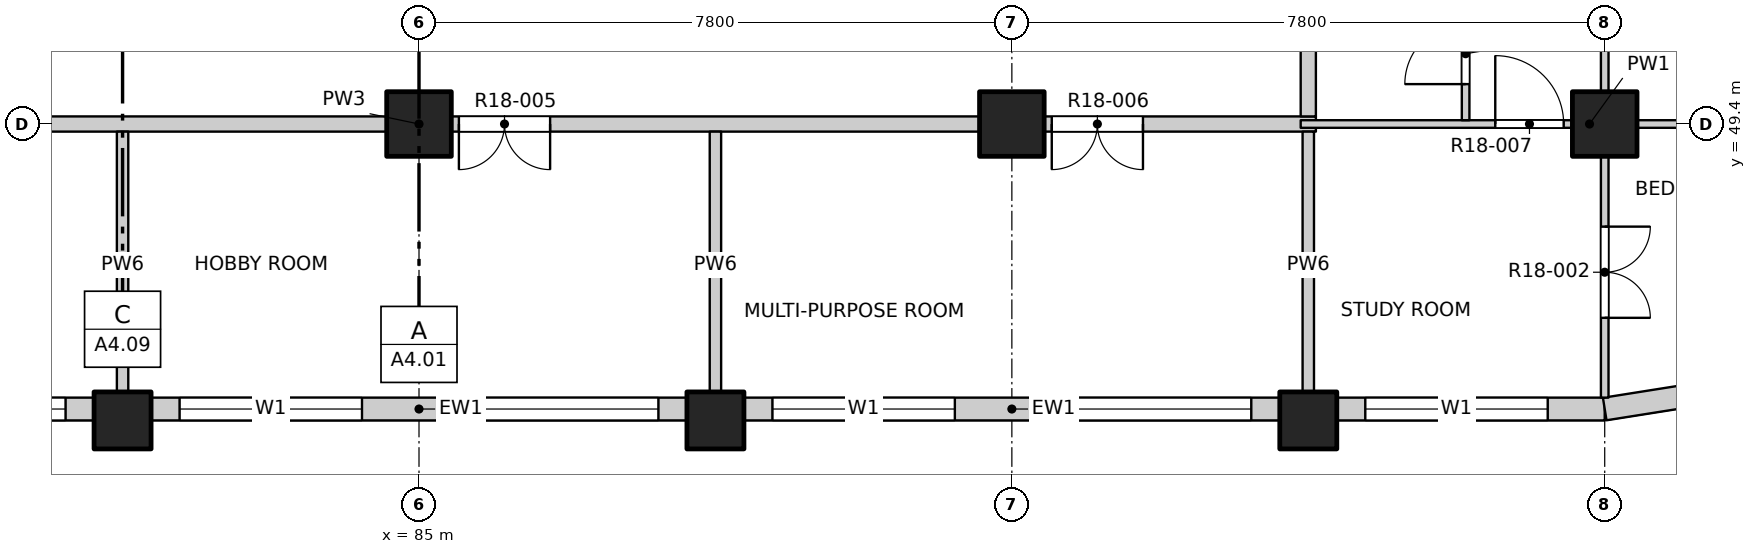
"""IFC4 building model, lengths in metres.
Left out: names, types, materials, properties, quantities, classifications, styles, units other than length and angle.
Written with IfcOpenShell. Run it as: python <this file> out.ifc"""

import sys

from ifc_helpers import new_model, si_unit, direction, frame, frame_2d, origin, origin_2d, place, context, subcontext, project, spatial, rectangle, extrude, element, fill, save


model = new_model("IFC4")
c1 = context("Model", 3, precision=1e-05, world=origin(), true_north=direction((0.0, 1.0)))
c2 = subcontext(c1, "Body", "Model", "MODEL_VIEW")
j1 = project(units=[si_unit("LENGTHUNIT", "METRE"), si_unit("PLANEANGLEUNIT", "RADIAN")], contexts=[c1])
p1 = place(None, origin())
s1 = spatial("IfcSite", under=j1, at=p1, CompositionType="ELEMENT")
p2 = place(p1, origin())
s2 = spatial("IfcBuilding", under=s1, at=p2, CompositionType="ELEMENT")
p3 = place(p2, frame((0.0, 0.0, 186.0)))
s3 = spatial("IfcBuildingStorey", under=s2, at=p3, CompositionType="ELEMENT", Elevation=186.0)
for number, where, z_axis, x_axis in (
    (1, (81.1, 45.5, -0.25), (0.0, 0.0, 1.0), (1.0, 0.0, 0.0)),
    (2, (88.9, 45.5, -0.25), (0.0, 0.0, 1.0), (1.0, 0.0, 0.0)),
    (3, (96.7, 45.5, -0.25), (0.0, 0.0, 1.0), (1.0, 0.0, 0.0)),
):
    element("IfcColumn", number, at=place(p3, frame(where, z_axis=z_axis, x_axis=x_axis)), inside=s3, PredefinedType="COLUMN", context=c2, shape_type="SweptSolid", body=[
        extrude(rectangle(XDim=0.75, YDim=0.75, at=origin_2d()), origin(), (0.0, 0.0, 1.0), 3.4),
    ])
for number, where, z_axis, x_axis in (
    (4, (85.0, 49.4, -0.25), (0.0, 0.0, 1.0), (1.0, 0.0, 0.0)),
    (5, (92.8, 49.4, -0.25), (0.0, 0.0, 1.0), (1.0, 0.0, 0.0)),
    (6, (100.6, 49.4, -0.25), (0.0, 0.0, 1.0), (1.0, 0.0, 0.0)),
):
    element("IfcColumn", number, at=place(p3, frame(where, z_axis=z_axis, x_axis=x_axis)), inside=s3, PredefinedType="COLUMN", context=c2, shape_type="SweptSolid", body=[
        extrude(rectangle(XDim=0.85, YDim=0.85, at=origin_2d()), origin(), (0.0, 0.0, 1.0), 3.4),
    ])
p4 = place(p3, frame((73.675, 45.65, 0.0), z_axis=(0.0, 0.0, 1.0), x_axis=(1.0, 0.0, 0.0)))
e7 = element("IfcWall", 7, at=p4, inside=s3, PredefinedType="SOLIDWALL", context=c2, shape_type="SweptSolid", body=[
    extrude(rectangle(XDim=7.05, YDim=0.3, at=frame_2d((3.525, 0.0))), origin(), (0.0, 0.0, 1.0), 2.7),
])
p5 = place(p4, frame((0.375, 0.0, 0.9)))
e8 = element("IfcOpeningElement", 8, at=p5, cuts=e7, PredefinedType="OPENING", context=c2, shape_type="SweptSolid", body=[
    extrude(rectangle(XDim=2.4, YDim=1.8, at=frame_2d((1.2, 0.9))), frame((0.0, 0.16, 0.0), z_axis=(0.0, -1.0, 0.0), x_axis=(1.0, 0.0, 0.0)), (0.0, 0.0, 1.0), 0.32),
])
p6 = place(p4, frame((4.275, 0.0, 0.9)))
e9 = element("IfcOpeningElement", 9, at=p6, cuts=e7, PredefinedType="OPENING", context=c2, shape_type="SweptSolid", body=[
    extrude(rectangle(XDim=2.4, YDim=1.8, at=frame_2d((1.2, 0.9))), frame((0.0, 0.16, 0.0), z_axis=(0.0, -1.0, 0.0), x_axis=(1.0, 0.0, 0.0)), (0.0, 0.0, 1.0), 0.32),
])
p7 = place(p3, frame((81.475, 45.65, 0.0), z_axis=(0.0, 0.0, 1.0), x_axis=(1.0, 0.0, 0.0)))
e10 = element("IfcWall", 10, at=p7, inside=s3, PredefinedType="SOLIDWALL", context=c2, shape_type="SweptSolid", body=[
    extrude(rectangle(XDim=7.05, YDim=0.3, at=frame_2d((3.525, 0.0))), origin(), (0.0, 0.0, 1.0), 2.7),
])
p8 = place(p7, frame((0.375, 0.0, 0.9)))
e11 = element("IfcOpeningElement", 11, at=p8, cuts=e10, PredefinedType="OPENING", context=c2, shape_type="SweptSolid", body=[
    extrude(rectangle(XDim=2.4, YDim=1.8, at=frame_2d((1.2, 0.9))), frame((0.0, 0.16, 0.0), z_axis=(0.0, -1.0, 0.0), x_axis=(1.0, 0.0, 0.0)), (0.0, 0.0, 1.0), 0.32),
])
p9 = place(p7, frame((4.275, 0.0, 0.9)))
e12 = element("IfcOpeningElement", 12, at=p9, cuts=e10, PredefinedType="OPENING", context=c2, shape_type="SweptSolid", body=[
    extrude(rectangle(XDim=2.4, YDim=1.8, at=frame_2d((1.2, 0.9))), frame((0.0, 0.16, 0.0), z_axis=(0.0, -1.0, 0.0), x_axis=(1.0, 0.0, 0.0)), (0.0, 0.0, 1.0), 0.32),
])
p10 = place(p3, frame((89.275, 45.65, 0.0), z_axis=(0.0, 0.0, 1.0), x_axis=(1.0, 0.0, 0.0)))
e13 = element("IfcWall", 13, at=p10, inside=s3, PredefinedType="SOLIDWALL", context=c2, shape_type="SweptSolid", body=[
    extrude(rectangle(XDim=7.05, YDim=0.3, at=frame_2d((3.525, 0.0))), origin(), (0.0, 0.0, 1.0), 2.7),
])
p11 = place(p10, frame((0.375, 0.0, 0.9)))
e14 = element("IfcOpeningElement", 14, at=p11, cuts=e13, PredefinedType="OPENING", context=c2, shape_type="SweptSolid", body=[
    extrude(rectangle(XDim=2.4, YDim=1.8, at=frame_2d((1.2, 0.9))), frame((0.0, 0.16, 0.0), z_axis=(0.0, -1.0, 0.0), x_axis=(1.0, 0.0, 0.0)), (0.0, 0.0, 1.0), 0.32),
])
p12 = place(p10, frame((4.275, 0.0, 0.9)))
e15 = element("IfcOpeningElement", 15, at=p12, cuts=e13, PredefinedType="OPENING", context=c2, shape_type="SweptSolid", body=[
    extrude(rectangle(XDim=2.4, YDim=1.8, at=frame_2d((1.2, 0.9))), frame((0.0, 0.16, 0.0), z_axis=(0.0, -1.0, 0.0), x_axis=(1.0, 0.0, 0.0)), (0.0, 0.0, 1.0), 0.32),
])
p13 = place(p3, frame((97.075, 45.65, 0.0), z_axis=(0.0, 0.0, 1.0), x_axis=(1.0, 0.0, 0.0)))
e16 = element("IfcWall", 16, at=p13, inside=s3, PredefinedType="SOLIDWALL", context=c2, shape_type="SweptSolid", body=[
    extrude(rectangle(XDim=3.525, YDim=0.3, at=frame_2d((1.763, 0.0))), origin(), (0.0, 0.0, 1.0), 2.7),
])
p14 = place(p13, frame((0.375, 0.0, 0.9)))
e17 = element("IfcOpeningElement", 17, at=p14, cuts=e16, PredefinedType="OPENING", context=c2, shape_type="SweptSolid", body=[
    extrude(rectangle(XDim=2.4, YDim=1.8, at=frame_2d((1.2, 0.9))), frame((0.0, 0.16, 0.0), z_axis=(0.0, -1.0, 0.0), x_axis=(1.0, 0.0, 0.0)), (0.0, 0.0, 1.0), 0.32),
])
p15 = place(p3, frame((100.6, 45.65, 0.0), z_axis=(0.0, 0.0, 1.0), x_axis=(0.987678452879, 0.156496880861, 0.0)))
e18 = element("IfcWall", 18, at=p15, inside=s3, PredefinedType="SOLIDWALL", context=c2, shape_type="SweptSolid", body=[
    extrude(rectangle(XDim=1.173, YDim=0.3, at=frame_2d((0.586, 0.0))), origin(), (0.0, 0.0, 1.0), 2.7),
])
p16 = place(p3, frame((73.2, 49.4, 0.0), z_axis=(0.0, 0.0, 1.0), x_axis=(1.0, 0.0, 0.0)))
e19 = element("IfcWall", 19, at=p16, inside=s3, PredefinedType="PARTITIONING", context=c2, shape_type="SweptSolid", body=[
    extrude(rectangle(XDim=23.6, YDim=0.2, at=frame_2d((11.8, 0.0))), origin(), (0.0, 0.0, 1.0), 3.15),
])
p17 = place(p16, frame((4.525, 0.0, 0.0)))
e20 = element("IfcOpeningElement", 20, at=p17, cuts=e19, PredefinedType="OPENING", context=c2, shape_type="SweptSolid", body=[
    extrude(rectangle(XDim=1.2, YDim=2.1, at=frame_2d((0.6, 1.05))), frame((0.0, 0.11, 0.0), z_axis=(0.0, -1.0, 0.0), x_axis=(1.0, 0.0, 0.0)), (0.0, 0.0, 1.0), 0.22),
])
p18 = place(p16, frame((12.325, 0.0, 0.0)))
e21 = element("IfcOpeningElement", 21, at=p18, cuts=e19, PredefinedType="OPENING", context=c2, shape_type="SweptSolid", body=[
    extrude(rectangle(XDim=1.2, YDim=2.1, at=frame_2d((0.6, 1.05))), frame((0.0, 0.11, 0.0), z_axis=(0.0, -1.0, 0.0), x_axis=(1.0, 0.0, 0.0)), (0.0, 0.0, 1.0), 0.22),
])
p19 = place(p16, frame((20.125, 0.0, 0.0)))
e22 = element("IfcOpeningElement", 22, at=p19, cuts=e19, PredefinedType="OPENING", context=c2, shape_type="SweptSolid", body=[
    extrude(rectangle(XDim=1.2, YDim=2.1, at=frame_2d((0.6, 1.05))), frame((0.0, 0.11, 0.0), z_axis=(0.0, -1.0, 0.0), x_axis=(1.0, 0.0, 0.0)), (0.0, 0.0, 1.0), 0.22),
])
p20 = place(p3, frame((96.6, 49.4, 0.0), z_axis=(0.0, 0.0, 1.0), x_axis=(1.0, 0.0, 0.0)))
e23 = element("IfcWall", 23, at=p20, inside=s3, PredefinedType="PARTITIONING", context=c2, shape_type="SweptSolid", body=[
    extrude(rectangle(XDim=7.6, YDim=0.1, at=frame_2d((3.8, 0.0))), origin(), (0.0, 0.0, 1.0), 3.15),
])
p21 = place(p20, frame((2.56, 0.0, 0.0)))
e24 = element("IfcOpeningElement", 24, at=p21, cuts=e23, PredefinedType="OPENING", context=c2, shape_type="SweptSolid", body=[
    extrude(rectangle(XDim=0.9, YDim=2.1, at=frame_2d((0.45, 1.05))), frame((0.0, 0.06, 0.0), z_axis=(0.0, -1.0, 0.0), x_axis=(1.0, 0.0, 0.0)), (0.0, 0.0, 1.0), 0.12),
])
for number, where, z_axis, x_axis in (
    (25, (81.1, 45.8, 0.0), (0.0, 0.0, 1.0), (0.0, 1.0, 0.0)),
    (26, (88.9, 45.8, 0.0), (0.0, 0.0, 1.0), (0.0, 1.0, 0.0)),
    (27, (96.7, 45.8, 0.0), (0.0, 0.0, 1.0), (0.0, 1.0, 0.0)),
):
    element("IfcWall", number, at=place(p3, frame(where, z_axis=z_axis, x_axis=x_axis)), inside=s3, PredefinedType="PARTITIONING", context=c2, shape_type="SweptSolid", body=[
        extrude(rectangle(XDim=3.5, YDim=0.15, at=frame_2d((1.75, 0.0))), origin(), (0.0, 0.0, 1.0), 3.15),
    ])
p22 = place(p3, frame((96.7, 49.5, 0.0), z_axis=(0.0, 0.0, 1.0), x_axis=(0.0, 1.0, 0.0)))
e28 = element("IfcWall", 28, at=p22, inside=s3, PredefinedType="PARTITIONING", context=c2, shape_type="SweptSolid", body=[
    extrude(rectangle(XDim=34.7, YDim=0.2, at=frame_2d((17.35, 0.0))), origin(), (0.0, 0.0, 1.0), 3.15),
])
p23 = place(p22, frame((7.425, 0.0, 0.0)))
e29 = element("IfcOpeningElement", 29, at=p23, cuts=e28, PredefinedType="OPENING", context=c2, shape_type="SweptSolid", body=[
    extrude(rectangle(XDim=1.0, YDim=2.1, at=frame_2d((0.5, 1.05))), frame((0.0, 0.11, 0.0), z_axis=(0.0, -1.0, 0.0), x_axis=(1.0, 0.0, 0.0)), (0.0, 0.0, 1.0), 0.22),
])
p24 = place(p22, frame((18.475, 0.0, 0.0)))
e30 = element("IfcOpeningElement", 30, at=p24, cuts=e28, PredefinedType="OPENING", context=c2, shape_type="SweptSolid", body=[
    extrude(rectangle(XDim=1.0, YDim=2.1, at=frame_2d((0.5, 1.05))), frame((0.0, 0.11, 0.0), z_axis=(0.0, -1.0, 0.0), x_axis=(1.0, 0.0, 0.0)), (0.0, 0.0, 1.0), 0.22),
])
p25 = place(p22, frame((29.025, 0.0, 0.0)))
e31 = element("IfcOpeningElement", 31, at=p25, cuts=e28, PredefinedType="OPENING", context=c2, shape_type="SweptSolid", body=[
    extrude(rectangle(XDim=1.0, YDim=2.1, at=frame_2d((0.5, 1.05))), frame((0.0, 0.11, 0.0), z_axis=(0.0, -1.0, 0.0), x_axis=(1.0, 0.0, 0.0)), (0.0, 0.0, 1.0), 0.22),
])
p26 = place(p3, frame((98.77, 49.45, 0.0), z_axis=(0.0, 0.0, 1.0), x_axis=(0.0, 1.0, 0.0)))
e32 = element("IfcWall", 32, at=p26, inside=s3, PredefinedType="PARTITIONING", context=c2, shape_type="SweptSolid", body=[
    extrude(rectangle(XDim=6.15, YDim=0.1, at=frame_2d((3.075, 0.0))), origin(), (0.0, 0.0, 1.0), 3.15),
])
p27 = place(p26, frame((0.475, 0.0, 0.0)))
e33 = element("IfcOpeningElement", 33, at=p27, cuts=e32, PredefinedType="OPENING", context=c2, shape_type="SweptSolid", body=[
    extrude(rectangle(XDim=0.8, YDim=2.1, at=frame_2d((0.4, 1.05))), frame((0.0, 0.06, 0.0), z_axis=(0.0, -1.0, 0.0), x_axis=(1.0, 0.0, 0.0)), (0.0, 0.0, 1.0), 0.12),
])
p28 = place(p26, frame((2.315, 0.0, 0.0)))
e34 = element("IfcOpeningElement", 34, at=p28, cuts=e32, PredefinedType="OPENING", context=c2, shape_type="SweptSolid", body=[
    extrude(rectangle(XDim=0.9, YDim=2.1, at=frame_2d((0.45, 1.05))), frame((0.0, 0.06, 0.0), z_axis=(0.0, -1.0, 0.0), x_axis=(1.0, 0.0, 0.0)), (0.0, 0.0, 1.0), 0.12),
])
p29 = place(p26, frame((4.515, 0.0, 0.0)))
e35 = element("IfcOpeningElement", 35, at=p29, cuts=e32, PredefinedType="OPENING", context=c2, shape_type="SweptSolid", body=[
    extrude(rectangle(XDim=0.9, YDim=2.1, at=frame_2d((0.45, 1.05))), frame((0.0, 0.06, 0.0), z_axis=(0.0, -1.0, 0.0), x_axis=(1.0, 0.0, 0.0)), (0.0, 0.0, 1.0), 0.12),
])
p30 = place(p3, frame((100.6, 45.8, 0.0), z_axis=(0.0, 0.0, 1.0), x_axis=(0.0, 1.0, 0.0)))
e36 = element("IfcWall", 36, at=p30, inside=s3, PredefinedType="PARTITIONING", context=c2, shape_type="SweptSolid", body=[
    extrude(rectangle(XDim=38.4, YDim=0.1, at=frame_2d((19.2, 0.0))), origin(), (0.0, 0.0, 1.0), 3.15),
])
p31 = place(p30, frame((1.05, 0.0, 0.0)))
e37 = element("IfcOpeningElement", 37, at=p31, cuts=e36, PredefinedType="OPENING", context=c2, shape_type="SweptSolid", body=[
    extrude(rectangle(XDim=1.2, YDim=2.1, at=frame_2d((0.6, 1.05))), frame((0.0, 0.06, 0.0), z_axis=(0.0, -1.0, 0.0), x_axis=(1.0, 0.0, 0.0)), (0.0, 0.0, 1.0), 0.12),
])
p32 = place(p30, frame((5.1, 0.0, 0.0)))
e38 = element("IfcOpeningElement", 38, at=p32, cuts=e36, PredefinedType="OPENING", context=c2, shape_type="SweptSolid", body=[
    extrude(rectangle(XDim=0.9, YDim=2.1, at=frame_2d((0.45, 1.05))), frame((0.0, 0.06, 0.0), z_axis=(0.0, -1.0, 0.0), x_axis=(1.0, 0.0, 0.0)), (0.0, 0.0, 1.0), 0.12),
])
p33 = place(p30, frame((9.0, 0.0, 0.0)))
e39 = element("IfcOpeningElement", 39, at=p33, cuts=e36, PredefinedType="OPENING", context=c2, shape_type="SweptSolid", body=[
    extrude(rectangle(XDim=0.9, YDim=2.1, at=frame_2d((0.45, 1.05))), frame((0.0, 0.06, 0.0), z_axis=(0.0, -1.0, 0.0), x_axis=(1.0, 0.0, 0.0)), (0.0, 0.0, 1.0), 0.12),
])
p34 = place(p30, frame((12.9, 0.0, 0.0)))
e40 = element("IfcOpeningElement", 40, at=p34, cuts=e36, PredefinedType="OPENING", context=c2, shape_type="SweptSolid", body=[
    extrude(rectangle(XDim=0.9, YDim=2.1, at=frame_2d((0.45, 1.05))), frame((0.0, 0.06, 0.0), z_axis=(0.0, -1.0, 0.0), x_axis=(1.0, 0.0, 0.0)), (0.0, 0.0, 1.0), 0.12),
])
p35 = place(p30, frame((19.725, 0.0, 0.0)))
e41 = element("IfcOpeningElement", 41, at=p35, cuts=e36, PredefinedType="OPENING", context=c2, shape_type="SweptSolid", body=[
    extrude(rectangle(XDim=1.2, YDim=2.1, at=frame_2d((0.6, 1.05))), frame((0.0, 0.06, 0.0), z_axis=(0.0, -1.0, 0.0), x_axis=(1.0, 0.0, 0.0)), (0.0, 0.0, 1.0), 0.12),
])
p36 = place(p30, frame((24.6, 0.0, 0.0)))
e42 = element("IfcOpeningElement", 42, at=p36, cuts=e36, PredefinedType="OPENING", context=c2, shape_type="SweptSolid", body=[
    extrude(rectangle(XDim=0.9, YDim=2.1, at=frame_2d((0.45, 1.05))), frame((0.0, 0.06, 0.0), z_axis=(0.0, -1.0, 0.0), x_axis=(1.0, 0.0, 0.0)), (0.0, 0.0, 1.0), 0.12),
])
p37 = place(p30, frame((28.5, 0.0, 0.0)))
e43 = element("IfcOpeningElement", 43, at=p37, cuts=e36, PredefinedType="OPENING", context=c2, shape_type="SweptSolid", body=[
    extrude(rectangle(XDim=0.9, YDim=2.1, at=frame_2d((0.45, 1.05))), frame((0.0, 0.06, 0.0), z_axis=(0.0, -1.0, 0.0), x_axis=(1.0, 0.0, 0.0)), (0.0, 0.0, 1.0), 0.12),
])
p38 = place(p30, frame((32.4, 0.0, 0.0)))
e44 = element("IfcOpeningElement", 44, at=p38, cuts=e36, PredefinedType="OPENING", context=c2, shape_type="SweptSolid", body=[
    extrude(rectangle(XDim=0.9, YDim=2.1, at=frame_2d((0.45, 1.05))), frame((0.0, 0.06, 0.0), z_axis=(0.0, -1.0, 0.0), x_axis=(1.0, 0.0, 0.0)), (0.0, 0.0, 1.0), 0.12),
])
p39 = place(p30, frame((36.15, 0.0, 0.0)))
e45 = element("IfcOpeningElement", 45, at=p39, cuts=e36, PredefinedType="OPENING", context=c2, shape_type="SweptSolid", body=[
    extrude(rectangle(XDim=1.2, YDim=2.1, at=frame_2d((0.6, 1.05))), frame((0.0, 0.06, 0.0), z_axis=(0.0, -1.0, 0.0), x_axis=(1.0, 0.0, 0.0)), (0.0, 0.0, 1.0), 0.12),
])
p40 = place(p6, origin())
e46 = element("IfcWindow", 46, at=p40, inside=s3, PartitioningType="DOUBLE_PANEL_VERTICAL", PredefinedType="WINDOW", context=c2, shape_type="SweptSolid", body=[
    extrude(rectangle(XDim=2.4, YDim=1.8, at=frame_2d((1.2, 0.9))), frame((0.0, 0.03, 0.0), z_axis=(0.0, -1.0, 0.0), x_axis=(1.0, 0.0, 0.0)), (0.0, 0.0, 1.0), 0.06),
])
fill(e9, e46)
p41 = place(p8, origin())
e47 = element("IfcWindow", 47, at=p41, inside=s3, PartitioningType="DOUBLE_PANEL_VERTICAL", PredefinedType="WINDOW", context=c2, shape_type="SweptSolid", body=[
    extrude(rectangle(XDim=2.4, YDim=1.8, at=frame_2d((1.2, 0.9))), frame((0.0, 0.03, 0.0), z_axis=(0.0, -1.0, 0.0), x_axis=(1.0, 0.0, 0.0)), (0.0, 0.0, 1.0), 0.06),
])
fill(e11, e47)
p42 = place(p9, origin())
e48 = element("IfcWindow", 48, at=p42, inside=s3, PartitioningType="DOUBLE_PANEL_VERTICAL", PredefinedType="WINDOW", context=c2, shape_type="SweptSolid", body=[
    extrude(rectangle(XDim=2.4, YDim=1.8, at=frame_2d((1.2, 0.9))), frame((0.0, 0.03, 0.0), z_axis=(0.0, -1.0, 0.0), x_axis=(1.0, 0.0, 0.0)), (0.0, 0.0, 1.0), 0.06),
])
fill(e12, e48)
p43 = place(p11, origin())
e49 = element("IfcWindow", 49, at=p43, inside=s3, PartitioningType="DOUBLE_PANEL_VERTICAL", PredefinedType="WINDOW", context=c2, shape_type="SweptSolid", body=[
    extrude(rectangle(XDim=2.4, YDim=1.8, at=frame_2d((1.2, 0.9))), frame((0.0, 0.03, 0.0), z_axis=(0.0, -1.0, 0.0), x_axis=(1.0, 0.0, 0.0)), (0.0, 0.0, 1.0), 0.06),
])
fill(e14, e49)
p44 = place(p12, origin())
e50 = element("IfcWindow", 50, at=p44, inside=s3, PartitioningType="DOUBLE_PANEL_VERTICAL", PredefinedType="WINDOW", context=c2, shape_type="SweptSolid", body=[
    extrude(rectangle(XDim=2.4, YDim=1.8, at=frame_2d((1.2, 0.9))), frame((0.0, 0.03, 0.0), z_axis=(0.0, -1.0, 0.0), x_axis=(1.0, 0.0, 0.0)), (0.0, 0.0, 1.0), 0.06),
])
fill(e15, e50)
p45 = place(p14, origin())
e51 = element("IfcWindow", 51, at=p45, inside=s3, PartitioningType="DOUBLE_PANEL_VERTICAL", PredefinedType="WINDOW", context=c2, shape_type="SweptSolid", body=[
    extrude(rectangle(XDim=2.4, YDim=1.8, at=frame_2d((1.2, 0.9))), frame((0.0, 0.03, 0.0), z_axis=(0.0, -1.0, 0.0), x_axis=(1.0, 0.0, 0.0)), (0.0, 0.0, 1.0), 0.06),
])
fill(e17, e51)
p46 = place(p31, origin())
e52 = element("IfcDoor", 52, at=p46, inside=s3, OperationType="DOUBLE_DOOR_SINGLE_SWING", PredefinedType="DOOR", context=c2, shape_type="SweptSolid", body=[
    extrude(rectangle(XDim=1.2, YDim=2.1, at=frame_2d((0.6, 1.05))), frame((0.0, 0.025, 0.0), z_axis=(0.0, -1.0, 0.0), x_axis=(1.0, 0.0, 0.0)), (0.0, 0.0, 1.0), 0.05),
])
fill(e37, e52)
p47 = place(p18, origin())
e53 = element("IfcDoor", 53, at=p47, inside=s3, OperationType="DOUBLE_DOOR_SINGLE_SWING", PredefinedType="DOOR", context=c2, shape_type="SweptSolid", body=[
    extrude(rectangle(XDim=1.2, YDim=2.1, at=frame_2d((0.6, 1.05))), frame((0.0, 0.025, 0.0), z_axis=(0.0, -1.0, 0.0), x_axis=(1.0, 0.0, 0.0)), (0.0, 0.0, 1.0), 0.05),
])
fill(e21, e53)
p48 = place(p19, origin())
e54 = element("IfcDoor", 54, at=p48, inside=s3, OperationType="DOUBLE_DOOR_SINGLE_SWING", PredefinedType="DOOR", context=c2, shape_type="SweptSolid", body=[
    extrude(rectangle(XDim=1.2, YDim=2.1, at=frame_2d((0.6, 1.05))), frame((0.0, 0.025, 0.0), z_axis=(0.0, -1.0, 0.0), x_axis=(1.0, 0.0, 0.0)), (0.0, 0.0, 1.0), 0.05),
])
fill(e22, e54)
p49 = place(p21, origin())
e55 = element("IfcDoor", 55, at=p49, inside=s3, OperationType="SINGLE_SWING_LEFT", PredefinedType="DOOR", context=c2, shape_type="SweptSolid", body=[
    extrude(rectangle(XDim=0.9, YDim=2.1, at=frame_2d((0.45, 1.05))), frame((0.0, 0.025, 0.0), z_axis=(0.0, -1.0, 0.0), x_axis=(1.0, 0.0, 0.0)), (0.0, 0.0, 1.0), 0.05),
])
fill(e24, e55)
p50 = place(p27, origin())
e56 = element("IfcDoor", 56, at=p50, inside=s3, OperationType="SINGLE_SWING_LEFT", PredefinedType="DOOR", context=c2, shape_type="SweptSolid", body=[
    extrude(rectangle(XDim=0.8, YDim=2.1, at=frame_2d((0.4, 1.05))), frame((0.0, 0.025, 0.0), z_axis=(0.0, -1.0, 0.0), x_axis=(1.0, 0.0, 0.0)), (0.0, 0.0, 1.0), 0.05),
])
fill(e33, e56)
save(model, sys.argv[1])
